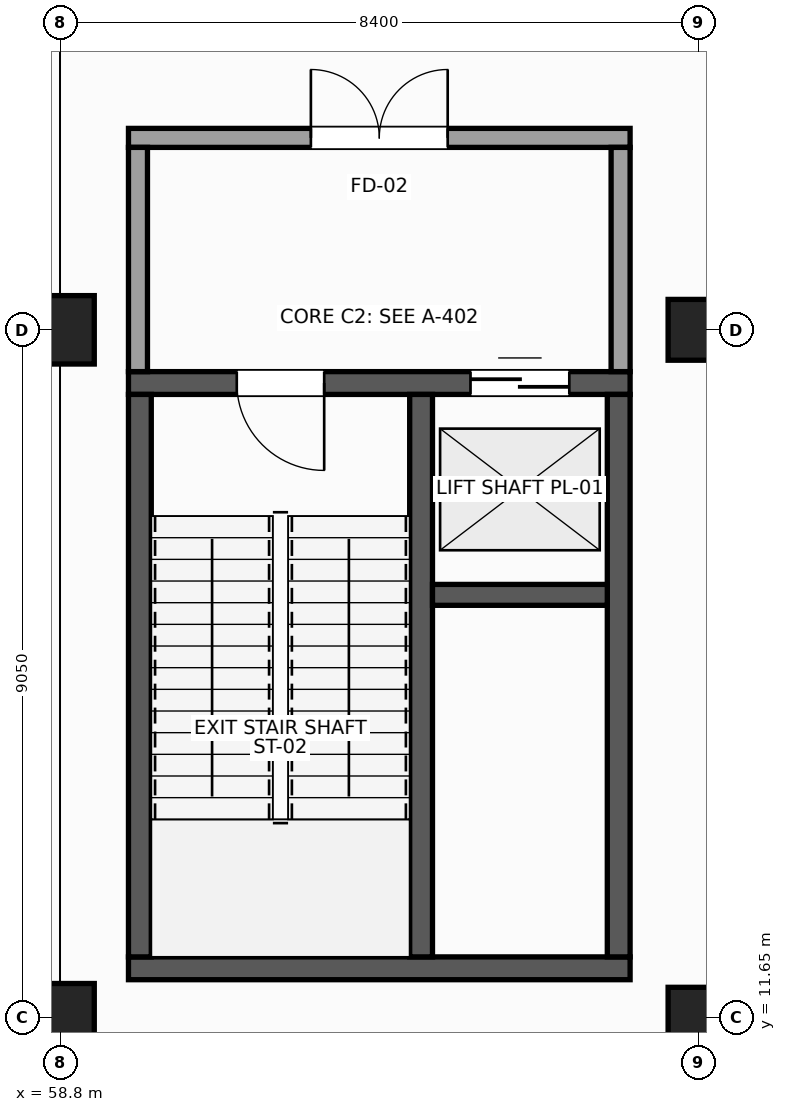
"""IFC4 building model, lengths in metres.
Left out: names, types, materials, properties, quantities, classifications, styles, units other than length and angle.
Written with IfcOpenShell. Run it as: python <this file> out.ifc"""

import sys

from ifc_helpers import new_model, si_unit, direction, frame, frame_2d, origin, origin_2d, place, context, subcontext, project, spatial, rectangle, extrude, element, fill, save


model = new_model("IFC4")
c1 = context("Model", 3, precision=1e-05, world=origin(), true_north=direction((0.0, 1.0)))
c2 = subcontext(c1, "Body", "Model", "MODEL_VIEW")
j1 = project(units=[si_unit("LENGTHUNIT", "METRE"), si_unit("PLANEANGLEUNIT", "RADIAN")], contexts=[c1])
p1 = place(None, origin())
s1 = spatial("IfcSite", under=j1, at=p1, CompositionType="ELEMENT")
p2 = place(p1, origin())
s2 = spatial("IfcBuilding", under=s1, at=p2, CompositionType="ELEMENT")
p3 = place(p2, frame((0.0, 0.0, -5.4)))
s3 = spatial("IfcBuildingStorey", under=s2, at=p3, CompositionType="ELEMENT", Elevation=-5.4)
for number, where, z_axis, x_axis in (
    (1, (58.8, 11.65, -0.4), (0.0, 0.0, 1.0), (1.0, 0.0, 0.0)),
    (2, (58.8, 20.7, -0.4), (0.0, 0.0, 1.0), (1.0, 0.0, 0.0)),
):
    element("IfcColumn", number, at=place(p3, frame(where, z_axis=z_axis, x_axis=x_axis)), inside=s3, PredefinedType="COLUMN", context=c2, shape_type="SweptSolid", body=[
        extrude(rectangle(XDim=0.9, YDim=0.9, at=origin_2d()), origin(), (0.0, 0.0, 1.0), 5.8),
    ])
for number, where, z_axis, x_axis in (
    (3, (67.2, 11.65, -0.4), (0.0, 0.0, 1.0), (1.0, 0.0, 0.0)),
    (4, (67.2, 20.7, -0.4), (0.0, 0.0, 1.0), (1.0, 0.0, 0.0)),
):
    element("IfcColumn", number, at=place(p3, frame(where, z_axis=z_axis, x_axis=x_axis)), inside=s3, PredefinedType="COLUMN", context=c2, shape_type="SweptSolid", body=[
        extrude(rectangle(XDim=0.8, YDim=0.8, at=origin_2d()), origin(), (0.0, 0.0, 1.0), 5.8),
    ])
p4 = place(p3, frame((59.7, 12.3, 0.0), z_axis=(0.0, 0.0, 1.0), x_axis=(1.0, 0.0, 0.0)))
e5 = element("IfcWall", 5, at=p4, inside=s3, PredefinedType="SHEAR", context=c2, shape_type="SweptSolid", body=[
    extrude(rectangle(XDim=6.6, YDim=0.3, at=frame_2d((3.3, 0.0))), origin(), (0.0, 0.0, 1.0), 5.08),
])
p5 = place(p3, frame((59.7, 20.0, 0.0), z_axis=(0.0, 0.0, 1.0), x_axis=(1.0, 0.0, 0.0)))
e6 = element("IfcWall", 6, at=p5, inside=s3, PredefinedType="SHEAR", context=c2, shape_type="SweptSolid", body=[
    extrude(rectangle(XDim=6.6, YDim=0.3, at=frame_2d((3.3, 0.0))), origin(), (0.0, 0.0, 1.0), 5.08),
])
p6 = place(p5, frame((1.425, 0.0, 0.0)))
e7 = element("IfcOpeningElement", 7, at=p6, cuts=e6, PredefinedType="OPENING", context=c2, shape_type="SweptSolid", body=[
    extrude(rectangle(XDim=1.15, YDim=2.2, at=frame_2d((0.575, 1.1))), frame((0.0, 0.16, 0.0), z_axis=(0.0, -1.0, 0.0), x_axis=(1.0, 0.0, 0.0)), (0.0, 0.0, 1.0), 0.32),
])
p7 = place(p5, frame((4.5, 0.0, 0.0)))
e8 = element("IfcOpeningElement", 8, at=p7, cuts=e6, PredefinedType="OPENING", context=c2, shape_type="SweptSolid", body=[
    extrude(rectangle(XDim=1.3, YDim=2.2, at=frame_2d((0.65, 1.1))), frame((0.0, 0.16, 0.0), z_axis=(0.0, -1.0, 0.0), x_axis=(1.0, 0.0, 0.0)), (0.0, 0.0, 1.0), 0.32),
])
for number, where, z_axis, x_axis in (
    (9, (59.85, 12.45, 0.0), (0.0, 0.0, 1.0), (0.0, 1.0, 0.0)),
    (10, (66.15, 12.45, 0.0), (0.0, 0.0, 1.0), (0.0, 1.0, 0.0)),
    (11, (63.55, 12.45, 0.0), (0.0, 0.0, 1.0), (0.0, 1.0, 0.0)),
):
    element("IfcWall", number, at=place(p3, frame(where, z_axis=z_axis, x_axis=x_axis)), inside=s3, PredefinedType="SHEAR", context=c2, shape_type="SweptSolid", body=[
        extrude(rectangle(XDim=7.4, YDim=0.3, at=frame_2d((3.7, 0.0))), origin(), (0.0, 0.0, 1.0), 5.08),
    ])
p8 = place(p3, frame((63.7, 17.213, 0.0), z_axis=(0.0, 0.0, 1.0), x_axis=(1.0, 0.0, 0.0)))
e12 = element("IfcWall", 12, at=p8, inside=s3, PredefinedType="SHEAR", context=c2, shape_type="SweptSolid", body=[
    extrude(rectangle(XDim=2.3, YDim=0.275, at=frame_2d((1.15, 0.0))), origin(), (0.0, 0.0, 1.0), 5.08),
])
p9 = place(p3, frame((59.7, 23.225, 0.0), z_axis=(0.0, 0.0, 1.0), x_axis=(1.0, 0.0, 0.0)))
e13 = element("IfcWall", 13, at=p9, inside=s3, PredefinedType="PARTITIONING", context=c2, shape_type="SweptSolid", body=[
    extrude(rectangle(XDim=6.6, YDim=0.25, at=frame_2d((3.3, 0.0))), origin(), (0.0, 0.0, 1.0), 5.08),
])
p10 = place(p9, frame((2.4, 0.0, 0.0)))
e14 = element("IfcOpeningElement", 14, at=p10, cuts=e13, PredefinedType="OPENING", context=c2, shape_type="SweptSolid", body=[
    extrude(rectangle(XDim=1.8, YDim=2.25, at=frame_2d((0.9, 1.125))), frame((0.0, 0.135, 0.0), z_axis=(0.0, -1.0, 0.0), x_axis=(1.0, 0.0, 0.0)), (0.0, 0.0, 1.0), 0.27),
])
for number, where, z_axis, x_axis in (
    (15, (59.825, 20.15, 0.0), (0.0, 0.0, 1.0), (0.0, 1.0, 0.0)),
    (16, (66.175, 20.15, 0.0), (0.0, 0.0, 1.0), (0.0, 1.0, 0.0)),
):
    element("IfcWall", number, at=place(p3, frame(where, z_axis=z_axis, x_axis=x_axis)), inside=s3, PredefinedType="PARTITIONING", context=c2, shape_type="SweptSolid", body=[
        extrude(rectangle(XDim=2.95, YDim=0.25, at=frame_2d((1.475, 0.0))), origin(), (0.0, 0.0, 1.0), 4.23),
    ])
p11 = place(p6, frame((1.15, 0.0, 0.0), z_axis=(0.0, 0.0, 1.0), x_axis=(-1.0, 0.0, 0.0)))
e17 = element("IfcDoor", 17, at=p11, inside=s3, OperationType="SINGLE_SWING_LEFT", PredefinedType="DOOR", context=c2, shape_type="SweptSolid", body=[
    extrude(rectangle(XDim=1.15, YDim=2.2, at=frame_2d((0.575, 1.1))), frame((0.0, 0.025, 0.0), z_axis=(0.0, -1.0, 0.0), x_axis=(1.0, 0.0, 0.0)), (0.0, 0.0, 1.0), 0.05),
])
fill(e7, e17)
p12 = place(p7, origin())
e18 = element("IfcDoor", 18, at=p12, inside=s3, OperationType="DOUBLE_DOOR_SLIDING", PredefinedType="DOOR", context=c2, shape_type="SweptSolid", body=[
    extrude(rectangle(XDim=1.3, YDim=2.2, at=frame_2d((0.65, 1.1))), frame((0.0, 0.025, 0.0), z_axis=(0.0, -1.0, 0.0), x_axis=(1.0, 0.0, 0.0)), (0.0, 0.0, 1.0), 0.05),
])
fill(e8, e18)
p13 = place(p10, origin())
e19 = element("IfcDoor", 19, at=p13, inside=s3, OperationType="DOUBLE_DOOR_SINGLE_SWING", PredefinedType="DOOR", context=c2, shape_type="SweptSolid", body=[
    extrude(rectangle(XDim=1.8, YDim=2.25, at=frame_2d((0.9, 1.125))), frame((0.0, 0.025, 0.0), z_axis=(0.0, -1.0, 0.0), x_axis=(1.0, 0.0, 0.0)), (0.0, 0.0, 1.0), 0.05),
])
fill(e14, e19)
save(model, sys.argv[1])
